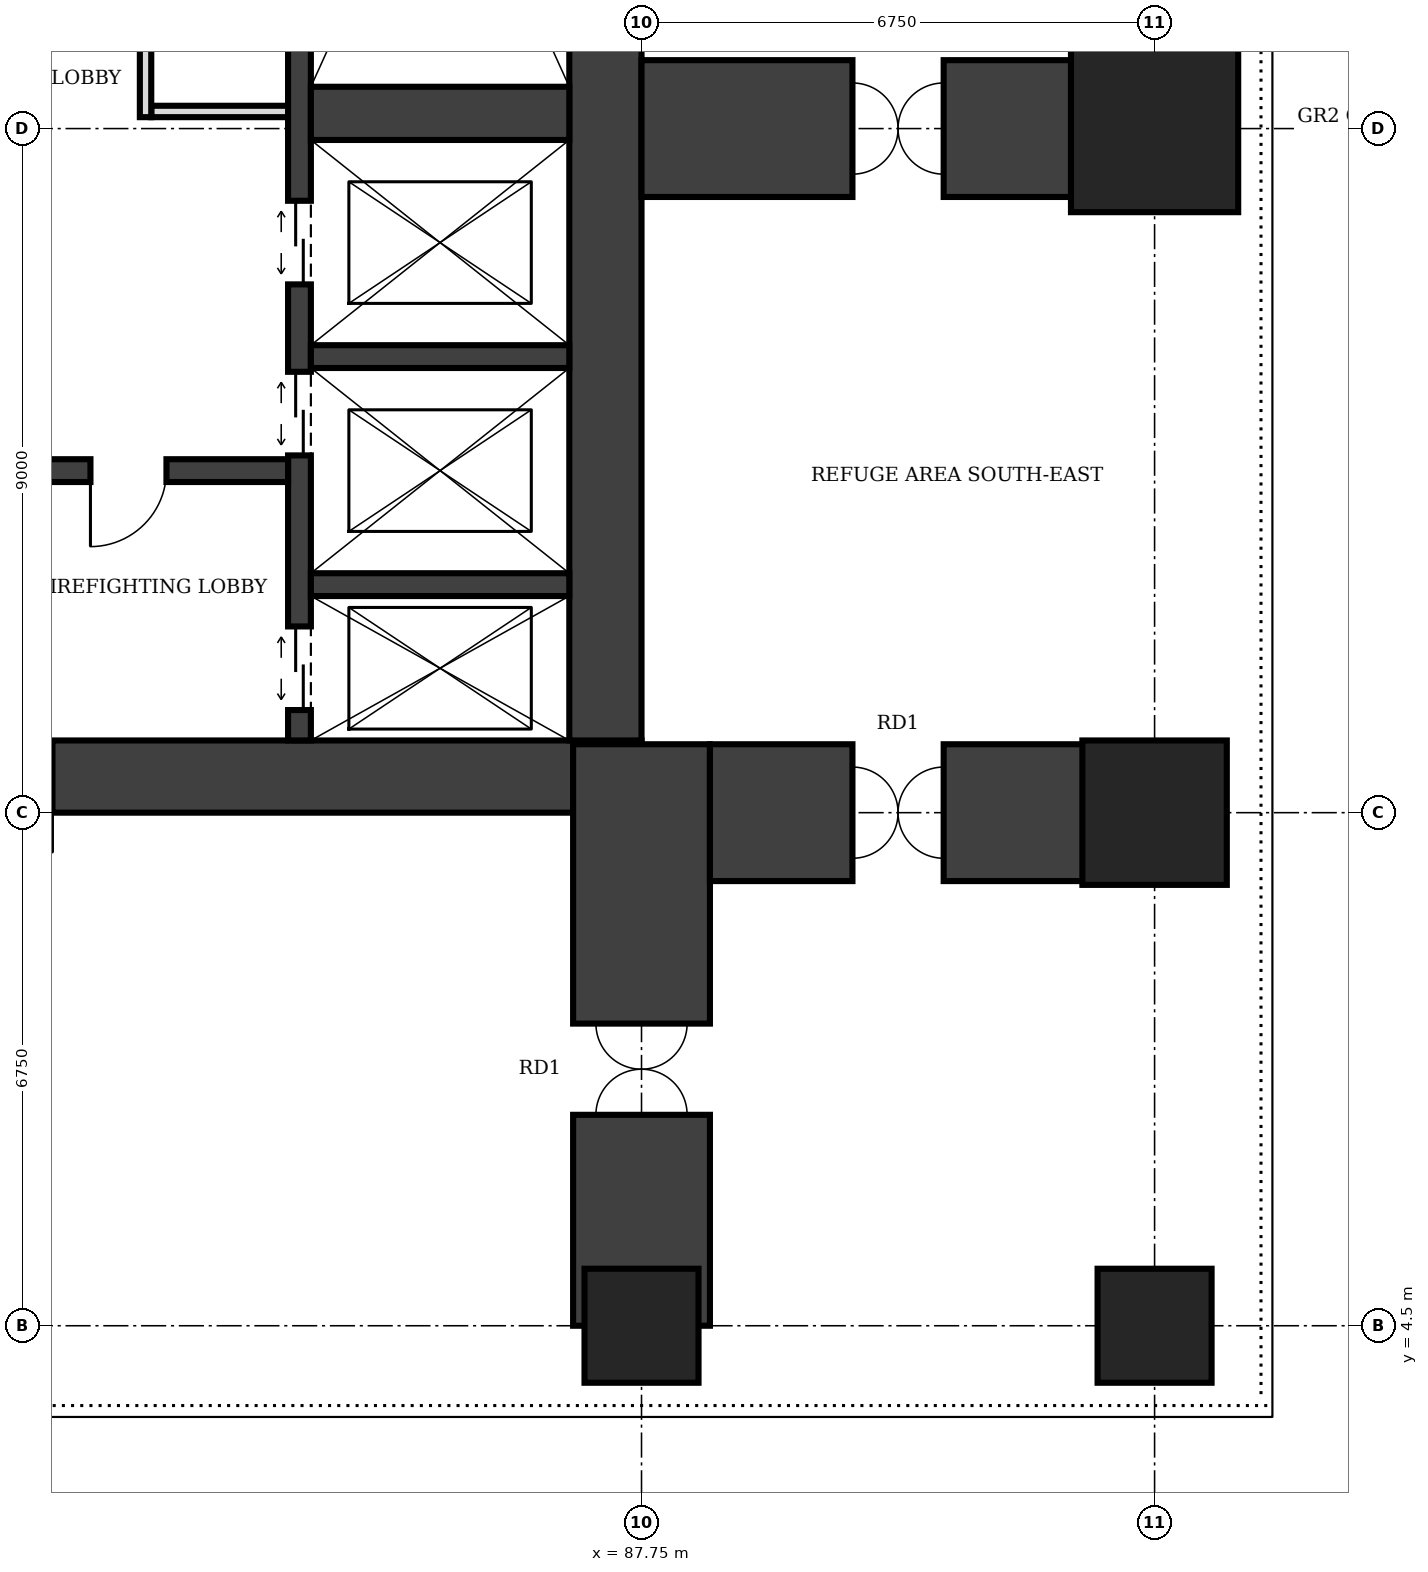
"""IFC4 building model, lengths in metres.
Left out: names, types, materials, properties, quantities, classifications, styles, units other than length and angle.
Written with IfcOpenShell. Run it as: python <this file> out.ifc"""

import sys

from ifc_helpers import new_model, si_unit, direction, frame, frame_2d, origin, origin_2d, place, context, subcontext, project, spatial, rectangle, extrude, element, fill, save


model = new_model("IFC4")
c1 = context("Model", 3, precision=1e-05, world=origin(), true_north=direction((0.0, 1.0)))
c2 = subcontext(c1, "Body", "Model", "MODEL_VIEW")
j1 = project(units=[si_unit("LENGTHUNIT", "METRE"), si_unit("PLANEANGLEUNIT", "RADIAN")], contexts=[c1])
p1 = place(None, origin())
s1 = spatial("IfcSite", under=j1, at=p1, CompositionType="ELEMENT")
p2 = place(p1, origin())
s2 = spatial("IfcBuilding", under=s1, at=p2, CompositionType="ELEMENT")
p3 = place(p2, frame((0.0, 0.0, 169.0)))
s3 = spatial("IfcBuildingStorey", under=s2, at=p3, CompositionType="ELEMENT", Elevation=169.0)
p4 = place(p3, frame((74.25, 11.725, 0.0), z_axis=(0.0, 0.0, 1.0), x_axis=(1.0, 0.0, 0.0)))
e1 = element("IfcWall", 1, at=p4, inside=s3, PredefinedType="SHEAR", context=c2, shape_type="SweptSolid", body=[
    extrude(rectangle(XDim=13.5, YDim=0.95, at=frame_2d((6.75, 0.0))), origin(), (0.0, 0.0, 1.0), 8.0),
])
p5 = place(p4, frame((4.75, 0.0, 0.0)))
e2 = element("IfcOpeningElement", 2, at=p5, cuts=e1, PredefinedType="OPENING", context=c2, shape_type="SweptSolid", body=[
    extrude(rectangle(XDim=1.0, YDim=2.1, at=frame_2d((0.5, 1.05))), frame((0.0, 0.485, 0.0), z_axis=(0.0, -1.0, 0.0), x_axis=(1.0, 0.0, 0.0)), (0.0, 0.0, 1.0), 0.97),
])
p6 = place(p3, frame((87.275, 12.2, 0.0), z_axis=(0.0, 0.0, 1.0), x_axis=(0.0, 1.0, 0.0)))
e3 = element("IfcWall", 3, at=p6, inside=s3, PredefinedType="SHEAR", context=c2, shape_type="SweptSolid", body=[
    extrude(rectangle(XDim=16.1, YDim=0.95, at=frame_2d((8.05, 0.0))), origin(), (0.0, 0.0, 1.0), 8.0),
])
p7 = place(p3, frame((83.25, 12.2, 0.0), z_axis=(0.0, 0.0, 1.0), x_axis=(0.0, 1.0, 0.0)))
e4 = element("IfcWall", 4, at=p7, inside=s3, PredefinedType="SHEAR", context=c2, shape_type="SweptSolid", body=[
    extrude(rectangle(XDim=16.1, YDim=0.3, at=frame_2d((8.05, 0.0))), origin(), (0.0, 0.0, 1.0), 8.0),
])
p8 = place(p7, frame((14.7, 0.0, 0.0)))
e5 = element("IfcOpeningElement", 5, at=p8, cuts=e4, PredefinedType="OPENING", context=c2, shape_type="SweptSolid", body=[
    extrude(rectangle(XDim=1.0, YDim=2.1, at=frame_2d((0.5, 1.05))), frame((0.0, 0.16, 0.0), z_axis=(0.0, -1.0, 0.0), x_axis=(1.0, 0.0, 0.0)), (0.0, 0.0, 1.0), 0.32),
])
p9 = place(p7, frame((0.4, 0.0, 0.0)))
e6 = element("IfcOpeningElement", 6, at=p9, cuts=e4, PredefinedType="OPENING", context=c2, shape_type="SweptSolid", body=[
    extrude(rectangle(XDim=1.1, YDim=2.1, at=frame_2d((0.55, 1.05))), frame((0.0, 0.16, 0.0), z_axis=(0.0, -1.0, 0.0), x_axis=(1.0, 0.0, 0.0)), (0.0, 0.0, 1.0), 0.32),
])
p10 = place(p7, frame((3.75, 0.0, 0.0)))
e7 = element("IfcOpeningElement", 7, at=p10, cuts=e4, PredefinedType="OPENING", context=c2, shape_type="SweptSolid", body=[
    extrude(rectangle(XDim=1.1, YDim=2.1, at=frame_2d((0.55, 1.05))), frame((0.0, 0.16, 0.0), z_axis=(0.0, -1.0, 0.0), x_axis=(1.0, 0.0, 0.0)), (0.0, 0.0, 1.0), 0.32),
])
p11 = place(p7, frame((6.0, 0.0, 0.0)))
e8 = element("IfcOpeningElement", 8, at=p11, cuts=e4, PredefinedType="OPENING", context=c2, shape_type="SweptSolid", body=[
    extrude(rectangle(XDim=1.1, YDim=2.1, at=frame_2d((0.55, 1.05))), frame((0.0, 0.16, 0.0), z_axis=(0.0, -1.0, 0.0), x_axis=(1.0, 0.0, 0.0)), (0.0, 0.0, 1.0), 0.32),
])
p12 = place(p3, frame((78.9, 15.75, 0.0), z_axis=(0.0, 0.0, 1.0), x_axis=(1.0, 0.0, 0.0)))
e9 = element("IfcWall", 9, at=p12, inside=s3, PredefinedType="SHEAR", context=c2, shape_type="SweptSolid", body=[
    extrude(rectangle(XDim=4.2, YDim=0.3, at=frame_2d((2.1, 0.0))), origin(), (0.0, 0.0, 1.0), 8.0),
])
p13 = place(p12, frame((1.6, 0.0, 0.0)))
e10 = element("IfcOpeningElement", 10, at=p13, cuts=e9, PredefinedType="OPENING", context=c2, shape_type="SweptSolid", body=[
    extrude(rectangle(XDim=1.0, YDim=2.1, at=frame_2d((0.5, 1.05))), frame((0.0, 0.16, 0.0), z_axis=(0.0, -1.0, 0.0), x_axis=(1.0, 0.0, 0.0)), (0.0, 0.0, 1.0), 0.32),
])
for number, where, z_axis, x_axis in (
    (11, (83.4, 14.25, 0.0), (0.0, 0.0, 1.0), (1.0, 0.0, 0.0)),
    (12, (83.4, 17.25, 0.0), (0.0, 0.0, 1.0), (1.0, 0.0, 0.0)),
):
    element("IfcWall", number, at=place(p3, frame(where, z_axis=z_axis, x_axis=x_axis)), inside=s3, PredefinedType="SHEAR", context=c2, shape_type="SweptSolid", body=[
        extrude(rectangle(XDim=3.4, YDim=0.3, at=frame_2d((1.7, 0.0))), origin(), (0.0, 0.0, 1.0), 8.0),
    ])
p14 = place(p3, frame((83.4, 20.45, 0.0), z_axis=(0.0, 0.0, 1.0), x_axis=(1.0, 0.0, 0.0)))
e13 = element("IfcWall", 13, at=p14, inside=s3, PredefinedType="SHEAR", context=c2, shape_type="SweptSolid", body=[
    extrude(rectangle(XDim=3.4, YDim=0.7, at=frame_2d((1.7, 0.0))), origin(), (0.0, 0.0, 1.0), 8.0),
])
for number, where, z_axis, x_axis in (
    (14, (87.75, 4.5, 0.0), (0.0, 0.0, 1.0), (1.0, 0.0, 0.0)),
    (15, (94.5, 4.5, 0.0), (0.0, 0.0, 1.0), (1.0, 0.0, 0.0)),
):
    element("IfcColumn", number, at=place(p3, frame(where, z_axis=z_axis, x_axis=x_axis)), inside=s3, PredefinedType="COLUMN", context=c2, shape_type="SweptSolid", body=[
        extrude(rectangle(XDim=1.5, YDim=1.5, at=origin_2d()), origin(), (0.0, 0.0, 1.0), 8.0),
    ])
p15 = place(p3, frame((94.5, 11.25, 0.0), z_axis=(0.0, 0.0, 1.0), x_axis=(1.0, 0.0, 0.0)))
e16 = element("IfcColumn", 16, at=p15, inside=s3, PredefinedType="COLUMN", context=c2, shape_type="SweptSolid", body=[
    extrude(rectangle(XDim=1.9, YDim=1.9, at=origin_2d()), origin(), (0.0, 0.0, 1.0), 8.0),
])
p16 = place(p3, frame((94.5, 20.25, 0.0), z_axis=(0.0, 0.0, 1.0), x_axis=(1.0, 0.0, 0.0)))
e17 = element("IfcColumn", 17, at=p16, inside=s3, PredefinedType="COLUMN", context=c2, shape_type="SweptSolid", body=[
    extrude(rectangle(XDim=2.2, YDim=2.2, at=origin_2d()), origin(), (0.0, 0.0, 1.0), 8.0),
])
p17 = place(p3, frame((87.75, 4.5, 0.0), z_axis=(0.0, 0.0, 1.0), x_axis=(0.0, 1.0, 0.0)))
e18 = element("IfcWall", 18, at=p17, inside=s3, PredefinedType="SHEAR", context=c2, shape_type="SweptSolid", body=[
    extrude(rectangle(XDim=7.65, YDim=1.8, at=frame_2d((3.825, 0.0))), origin(), (0.0, 0.0, 1.0), 8.0),
])
p18 = place(p17, frame((2.775, 0.0, 0.0)))
e19 = element("IfcOpeningElement", 19, at=p18, cuts=e18, PredefinedType="OPENING", context=c2, shape_type="SweptSolid", body=[
    extrude(rectangle(XDim=1.2, YDim=2.1, at=frame_2d((0.6, 1.05))), frame((0.0, 0.91, 0.0), z_axis=(0.0, -1.0, 0.0), x_axis=(1.0, 0.0, 0.0)), (0.0, 0.0, 1.0), 1.82),
])
p19 = place(p3, frame((87.75, 20.25, 0.0), z_axis=(0.0, 0.0, 1.0), x_axis=(1.0, 0.0, 0.0)))
e20 = element("IfcWall", 20, at=p19, inside=s3, PredefinedType="SHEAR", context=c2, shape_type="SweptSolid", body=[
    extrude(rectangle(XDim=6.75, YDim=1.8, at=frame_2d((3.375, 0.0))), origin(), (0.0, 0.0, 1.0), 8.0),
])
p20 = place(p19, frame((2.775, 0.0, 0.0)))
e21 = element("IfcOpeningElement", 21, at=p20, cuts=e20, PredefinedType="OPENING", context=c2, shape_type="SweptSolid", body=[
    extrude(rectangle(XDim=1.2, YDim=2.1, at=frame_2d((0.6, 1.05))), frame((0.0, 0.91, 0.0), z_axis=(0.0, -1.0, 0.0), x_axis=(1.0, 0.0, 0.0)), (0.0, 0.0, 1.0), 1.82),
])
p21 = place(p3, frame((88.65, 11.25, 0.0), z_axis=(0.0, 0.0, 1.0), x_axis=(1.0, 0.0, 0.0)))
e22 = element("IfcWall", 22, at=p21, inside=s3, PredefinedType="SHEAR", context=c2, shape_type="SweptSolid", body=[
    extrude(rectangle(XDim=5.85, YDim=1.8, at=frame_2d((2.925, 0.0))), origin(), (0.0, 0.0, 1.0), 8.0),
])
p22 = place(p21, frame((1.875, 0.0, 0.0)))
e23 = element("IfcOpeningElement", 23, at=p22, cuts=e22, PredefinedType="OPENING", context=c2, shape_type="SweptSolid", body=[
    extrude(rectangle(XDim=1.2, YDim=2.1, at=frame_2d((0.6, 1.05))), frame((0.0, 0.91, 0.0), z_axis=(0.0, -1.0, 0.0), x_axis=(1.0, 0.0, 0.0)), (0.0, 0.0, 1.0), 1.82),
])
p23 = place(p3, frame((81.225, 20.4, 0.0), z_axis=(0.0, 0.0, 1.0), x_axis=(0.0, 1.0, 0.0)))
e24 = element("IfcWall", 24, at=p23, inside=s3, PredefinedType="PARTITIONING", context=c2, shape_type="SweptSolid", body=[
    extrude(rectangle(XDim=6.0, YDim=0.15, at=frame_2d((3.0, 0.0))), origin(), (0.0, 0.0, 1.0), 7.75),
])
p24 = place(p23, frame((0.9, 0.0, 0.0)))
e25 = element("IfcOpeningElement", 25, at=p24, cuts=e24, PredefinedType="OPENING", context=c2, shape_type="SweptSolid", body=[
    extrude(rectangle(XDim=0.9, YDim=2.1, at=frame_2d((0.45, 1.05))), frame((0.0, 0.085, 0.0), z_axis=(0.0, -1.0, 0.0), x_axis=(1.0, 0.0, 0.0)), (0.0, 0.0, 1.0), 0.17),
])
p25 = place(p23, frame((3.825, 0.0, 0.0)))
e26 = element("IfcOpeningElement", 26, at=p25, cuts=e24, PredefinedType="OPENING", context=c2, shape_type="SweptSolid", body=[
    extrude(rectangle(XDim=0.9, YDim=2.1, at=frame_2d((0.45, 1.05))), frame((0.0, 0.085, 0.0), z_axis=(0.0, -1.0, 0.0), x_axis=(1.0, 0.0, 0.0)), (0.0, 0.0, 1.0), 0.17),
])
p26 = place(p3, frame((81.3, 20.475, 0.0), z_axis=(0.0, 0.0, 1.0), x_axis=(1.0, 0.0, 0.0)))
e27 = element("IfcWall", 27, at=p26, inside=s3, PredefinedType="PARTITIONING", context=c2, shape_type="SweptSolid", body=[
    extrude(rectangle(XDim=1.8, YDim=0.15, at=frame_2d((0.9, 0.0))), origin(), (0.0, 0.0, 1.0), 7.75),
])
p27 = place(p13, frame((1.0, 0.0, 0.0), z_axis=(0.0, 0.0, 1.0), x_axis=(-1.0, 0.0, 0.0)))
e28 = element("IfcDoor", 28, at=p27, inside=s3, OperationType="SINGLE_SWING_RIGHT", PredefinedType="DOOR", context=c2, shape_type="SweptSolid", body=[
    extrude(rectangle(XDim=1.0, YDim=2.1, at=frame_2d((0.5, 1.05))), frame((0.0, 0.025, 0.0), z_axis=(0.0, -1.0, 0.0), x_axis=(1.0, 0.0, 0.0)), (0.0, 0.0, 1.0), 0.05),
])
fill(e10, e28)
p28 = place(p9, origin())
e29 = element("IfcDoor", 29, at=p28, inside=s3, OperationType="DOUBLE_DOOR_SLIDING", PredefinedType="DOOR", context=c2, shape_type="SweptSolid", body=[
    extrude(rectangle(XDim=1.1, YDim=2.1, at=frame_2d((0.55, 1.05))), frame((0.0, 0.025, 0.0), z_axis=(0.0, -1.0, 0.0), x_axis=(1.0, 0.0, 0.0)), (0.0, 0.0, 1.0), 0.05),
])
fill(e6, e29)
p29 = place(p10, origin())
e30 = element("IfcDoor", 30, at=p29, inside=s3, OperationType="DOUBLE_DOOR_SLIDING", PredefinedType="DOOR", context=c2, shape_type="SweptSolid", body=[
    extrude(rectangle(XDim=1.1, YDim=2.1, at=frame_2d((0.55, 1.05))), frame((0.0, 0.025, 0.0), z_axis=(0.0, -1.0, 0.0), x_axis=(1.0, 0.0, 0.0)), (0.0, 0.0, 1.0), 0.05),
])
fill(e7, e30)
p30 = place(p11, origin())
e31 = element("IfcDoor", 31, at=p30, inside=s3, OperationType="DOUBLE_DOOR_SLIDING", PredefinedType="DOOR", context=c2, shape_type="SweptSolid", body=[
    extrude(rectangle(XDim=1.1, YDim=2.1, at=frame_2d((0.55, 1.05))), frame((0.0, 0.025, 0.0), z_axis=(0.0, -1.0, 0.0), x_axis=(1.0, 0.0, 0.0)), (0.0, 0.0, 1.0), 0.05),
])
fill(e8, e31)
p31 = place(p18, origin())
e32 = element("IfcDoor", 32, at=p31, inside=s3, OperationType="DOUBLE_DOOR_DOUBLE_SWING", PredefinedType="DOOR", context=c2, shape_type="SweptSolid", body=[
    extrude(rectangle(XDim=1.2, YDim=2.1, at=frame_2d((0.6, 1.05))), frame((0.0, 0.025, 0.0), z_axis=(0.0, -1.0, 0.0), x_axis=(1.0, 0.0, 0.0)), (0.0, 0.0, 1.0), 0.05),
])
fill(e19, e32)
p32 = place(p20, origin())
e33 = element("IfcDoor", 33, at=p32, inside=s3, OperationType="DOUBLE_DOOR_DOUBLE_SWING", PredefinedType="DOOR", context=c2, shape_type="SweptSolid", body=[
    extrude(rectangle(XDim=1.2, YDim=2.1, at=frame_2d((0.6, 1.05))), frame((0.0, 0.025, 0.0), z_axis=(0.0, -1.0, 0.0), x_axis=(1.0, 0.0, 0.0)), (0.0, 0.0, 1.0), 0.05),
])
fill(e21, e33)
p33 = place(p22, origin())
e34 = element("IfcDoor", 34, at=p33, inside=s3, OperationType="DOUBLE_DOOR_DOUBLE_SWING", PredefinedType="DOOR", context=c2, shape_type="SweptSolid", body=[
    extrude(rectangle(XDim=1.2, YDim=2.1, at=frame_2d((0.6, 1.05))), frame((0.0, 0.025, 0.0), z_axis=(0.0, -1.0, 0.0), x_axis=(1.0, 0.0, 0.0)), (0.0, 0.0, 1.0), 0.05),
])
fill(e23, e34)
save(model, sys.argv[1])
